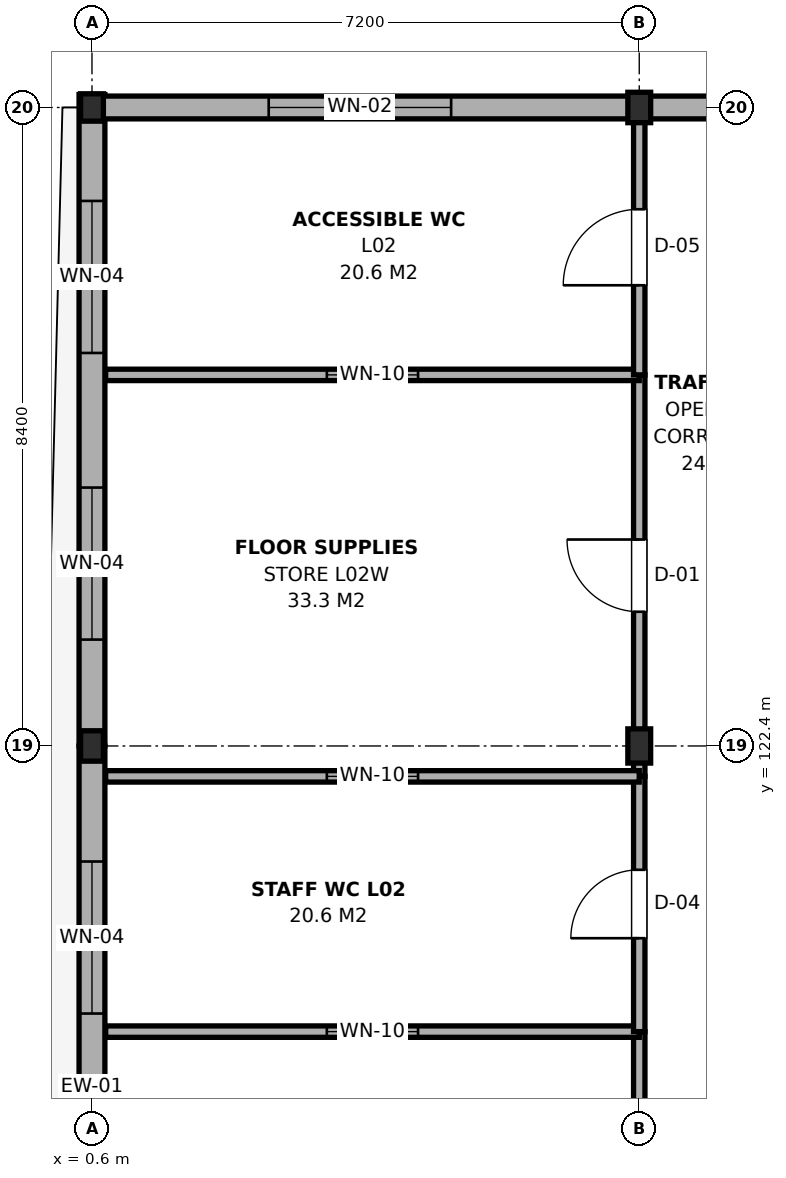
"""IFC4 building model, lengths in metres.
Left out: names, types, materials, properties, quantities, classifications, styles, units other than length and angle.
Written with IfcOpenShell. Run it as: python <this file> out.ifc"""

import sys

from ifc_helpers import new_model, si_unit, direction, frame, frame_2d, origin, origin_2d, place, context, subcontext, project, spatial, rectangle, i_section, extrude, element, fill, save


model = new_model("IFC4")
c1 = context("Model", 3, precision=1e-05, world=origin(), true_north=direction((0.0, 1.0)))
c2 = subcontext(c1, "Body", "Model", "MODEL_VIEW")
j1 = project(units=[si_unit("LENGTHUNIT", "METRE"), si_unit("PLANEANGLEUNIT", "RADIAN")], contexts=[c1])
p1 = place(None, origin())
s1 = spatial("IfcSite", under=j1, at=p1, CompositionType="ELEMENT")
p2 = place(p1, origin())
s2 = spatial("IfcBuilding", under=s1, at=p2, CompositionType="ELEMENT")
p3 = place(p2, frame((0.0, 0.0, 9.0)))
s3 = spatial("IfcBuildingStorey", under=s2, at=p3, CompositionType="ELEMENT", Elevation=9.0)
p4 = place(p3, frame((0.6, 122.4, 0.0), z_axis=(0.0, 0.0, 1.0), x_axis=(1.0, 0.0, 0.0)))
e1 = element("IfcColumn", 1, at=p4, inside=s3, PredefinedType="COLUMN", context=c2, shape_type="SweptSolid", body=[
    extrude(i_section(OverallWidth=0.3, OverallDepth=0.4, WebThickness=0.013, FlangeThickness=0.024, FilletRadius=0.027, at=origin_2d()), origin(), (0.0, 0.0, 1.0), 4.2),
])
p5 = place(p3, frame((0.6, 130.8, 0.0), z_axis=(0.0, 0.0, 1.0), x_axis=(1.0, 0.0, 0.0)))
e2 = element("IfcColumn", 2, at=p5, inside=s3, PredefinedType="COLUMN", context=c2, shape_type="SweptSolid", body=[
    extrude(i_section(OverallWidth=0.3, OverallDepth=0.36, WebThickness=0.012, FlangeThickness=0.022, FilletRadius=0.027, at=origin_2d()), origin(), (0.0, 0.0, 1.0), 4.2),
])
p6 = place(p3, frame((7.8, 122.4, 0.0), z_axis=(0.0, 0.0, 1.0), x_axis=(1.0, 0.0, 0.0)))
e3 = element("IfcColumn", 3, at=p6, inside=s3, PredefinedType="COLUMN", context=c2, shape_type="SweptSolid", body=[
    extrude(i_section(OverallWidth=0.3, OverallDepth=0.45, WebThickness=0.014, FlangeThickness=0.026, FilletRadius=0.027, at=origin_2d()), origin(), (0.0, 0.0, 1.0), 4.2),
])
p7 = place(p3, frame((7.8, 130.8, 0.0), z_axis=(0.0, 0.0, 1.0), x_axis=(1.0, 0.0, 0.0)))
e4 = element("IfcColumn", 4, at=p7, inside=s3, PredefinedType="COLUMN", context=c2, shape_type="SweptSolid", body=[
    extrude(i_section(OverallWidth=0.3, OverallDepth=0.4, WebThickness=0.013, FlangeThickness=0.024, FilletRadius=0.027, at=origin_2d()), origin(), (0.0, 0.0, 1.0), 4.2),
])
p8 = place(p3, frame((0.6, 113.4, 0.0), z_axis=(0.0, 0.0, 1.0), x_axis=(0.0, 1.0, 0.0)))
e5 = element("IfcWall", 5, at=p8, inside=s3, PredefinedType="SOLIDWALL", context=c2, shape_type="SweptSolid", body=[
    extrude(rectangle(XDim=9.0, YDim=0.34, at=frame_2d((4.5, 0.0))), origin(), (0.0, 0.0, 1.0), 3.385),
])
p9 = place(p8, frame((1.52, 0.0, 0.9)))
e6 = element("IfcOpeningElement", 6, at=p9, cuts=e5, PredefinedType="OPENING", context=c2, shape_type="SweptSolid", body=[
    extrude(rectangle(XDim=2.0, YDim=1.8, at=frame_2d((1.0, 0.9))), frame((0.0, 0.185, 0.0), z_axis=(0.0, -1.0, 0.0), x_axis=(1.0, 0.0, 0.0)), (0.0, 0.0, 1.0), 0.37),
])
p10 = place(p8, frame((5.48, 0.0, 0.9)))
e7 = element("IfcOpeningElement", 7, at=p10, cuts=e5, PredefinedType="OPENING", context=c2, shape_type="SweptSolid", body=[
    extrude(rectangle(XDim=2.0, YDim=1.8, at=frame_2d((1.0, 0.9))), frame((0.0, 0.185, 0.0), z_axis=(0.0, -1.0, 0.0), x_axis=(1.0, 0.0, 0.0)), (0.0, 0.0, 1.0), 0.37),
])
p11 = place(p3, frame((0.6, 122.4, 0.0), z_axis=(0.0, 0.0, 1.0), x_axis=(0.0, 1.0, 0.0)))
e8 = element("IfcWall", 8, at=p11, inside=s3, PredefinedType="SOLIDWALL", context=c2, shape_type="SweptSolid", body=[
    extrude(rectangle(XDim=8.57, YDim=0.34, at=frame_2d((4.285, 0.0))), origin(), (0.0, 0.0, 1.0), 3.435),
])
p12 = place(p11, frame((1.4, 0.0, 0.9)))
e9 = element("IfcOpeningElement", 9, at=p12, cuts=e8, PredefinedType="OPENING", context=c2, shape_type="SweptSolid", body=[
    extrude(rectangle(XDim=2.0, YDim=1.8, at=frame_2d((1.0, 0.9))), frame((0.0, 0.185, 0.0), z_axis=(0.0, -1.0, 0.0), x_axis=(1.0, 0.0, 0.0)), (0.0, 0.0, 1.0), 0.37),
])
p13 = place(p11, frame((5.17, 0.0, 0.9)))
e10 = element("IfcOpeningElement", 10, at=p13, cuts=e8, PredefinedType="OPENING", context=c2, shape_type="SweptSolid", body=[
    extrude(rectangle(XDim=2.0, YDim=1.8, at=frame_2d((1.0, 0.9))), frame((0.0, 0.185, 0.0), z_axis=(0.0, -1.0, 0.0), x_axis=(1.0, 0.0, 0.0)), (0.0, 0.0, 1.0), 0.37),
])
p14 = place(p3, frame((0.45, 130.8, 0.0), z_axis=(0.0, 0.0, 1.0), x_axis=(1.0, 0.0, 0.0)))
e11 = element("IfcWall", 11, at=p14, inside=s3, PredefinedType="SOLIDWALL", context=c2, shape_type="SweptSolid", body=[
    extrude(rectangle(XDim=7.35, YDim=0.3, at=frame_2d((3.675, 0.0))), origin(), (0.0, 0.0, 1.0), 3.375),
])
p15 = place(p14, frame((2.475, 0.0, 0.9)))
e12 = element("IfcOpeningElement", 12, at=p15, cuts=e11, PredefinedType="OPENING", context=c2, shape_type="SweptSolid", body=[
    extrude(rectangle(XDim=2.4, YDim=2.1, at=frame_2d((1.2, 1.05))), frame((0.0, 0.165, 0.0), z_axis=(0.0, -1.0, 0.0), x_axis=(1.0, 0.0, 0.0)), (0.0, 0.0, 1.0), 0.33),
])
p16 = place(p3, frame((7.8, 130.8, 0.0), z_axis=(0.0, 0.0, 1.0), x_axis=(1.0, 0.0, 0.0)))
e13 = element("IfcWall", 13, at=p16, inside=s3, PredefinedType="SOLIDWALL", context=c2, shape_type="SweptSolid", body=[
    extrude(rectangle(XDim=7.2, YDim=0.3, at=frame_2d((3.6, 0.0))), origin(), (0.0, 0.0, 1.0), 3.375),
])
p17 = place(p16, frame((3.35, 0.0, 0.9)))
e14 = element("IfcOpeningElement", 14, at=p17, cuts=e13, PredefinedType="OPENING", context=c2, shape_type="SweptSolid", body=[
    extrude(rectangle(XDim=2.4, YDim=2.1, at=frame_2d((1.2, 1.05))), frame((0.0, 0.165, 0.0), z_axis=(0.0, -1.0, 0.0), x_axis=(1.0, 0.0, 0.0)), (0.0, 0.0, 1.0), 0.33),
])
p18 = place(p3, frame((7.8, 113.4, 0.0), z_axis=(0.0, 0.0, 1.0), x_axis=(0.0, 1.0, 0.0)))
e15 = element("IfcWall", 15, at=p18, inside=s3, PredefinedType="PARTITIONING", context=c2, shape_type="SweptSolid", body=[
    extrude(rectangle(XDim=5.242, YDim=0.15, at=frame_2d((2.621, 0.0))), origin(), (0.0, 0.0, 1.0), 3.585),
])
p19 = place(p18, frame((2.146, 0.0, 0.0)))
e16 = element("IfcOpeningElement", 16, at=p19, cuts=e15, PredefinedType="OPENING", context=c2, shape_type="SweptSolid", body=[
    extrude(rectangle(XDim=0.95, YDim=2.15, at=frame_2d((0.475, 1.075))), frame((0.0, 0.09, 0.0), z_axis=(0.0, -1.0, 0.0), x_axis=(1.0, 0.0, 0.0)), (0.0, 0.0, 1.0), 0.18),
])
p20 = place(p3, frame((0.78, 118.642, 0.0), z_axis=(0.0, 0.0, 1.0), x_axis=(1.0, 0.0, 0.0)))
e17 = element("IfcWall", 17, at=p20, inside=s3, PredefinedType="PARTITIONING", context=c2, shape_type="SweptSolid", body=[
    extrude(rectangle(XDim=7.02, YDim=0.15, at=frame_2d((3.51, 0.0))), origin(), (0.0, 0.0, 1.0), 3.435),
])
p21 = place(p20, frame((2.91, 0.0, 0.95)))
e18 = element("IfcOpeningElement", 18, at=p21, cuts=e17, PredefinedType="OPENING", context=c2, shape_type="SweptSolid", body=[
    extrude(rectangle(XDim=1.2, YDim=1.5, at=frame_2d((0.6, 0.75))), frame((0.0, 0.09, 0.0), z_axis=(0.0, -1.0, 0.0), x_axis=(1.0, 0.0, 0.0)), (0.0, 0.0, 1.0), 0.18),
])
p22 = place(p3, frame((7.8, 118.642, 0.0), z_axis=(0.0, 0.0, 1.0), x_axis=(0.0, 1.0, 0.0)))
e19 = element("IfcWall", 19, at=p22, inside=s3, PredefinedType="PARTITIONING", context=c2, shape_type="SweptSolid", body=[
    extrude(rectangle(XDim=3.358, YDim=0.15, at=frame_2d((1.679, 0.0))), origin(), (0.0, 0.0, 1.0), 3.625),
])
p23 = place(p22, frame((1.229, 0.0, 0.0)))
e20 = element("IfcOpeningElement", 20, at=p23, cuts=e19, PredefinedType="OPENING", context=c2, shape_type="SweptSolid", body=[
    extrude(rectangle(XDim=0.9, YDim=2.15, at=frame_2d((0.45, 1.075))), frame((0.0, 0.09, 0.0), z_axis=(0.0, -1.0, 0.0), x_axis=(1.0, 0.0, 0.0)), (0.0, 0.0, 1.0), 0.18),
])
p24 = place(p3, frame((7.8, 122.0, 0.0), z_axis=(0.0, 0.0, 1.0), x_axis=(0.0, 1.0, 0.0)))
e21 = element("IfcWall", 21, at=p24, inside=s3, PredefinedType="PARTITIONING", context=c2, shape_type="SweptSolid", body=[
    extrude(rectangle(XDim=5.282, YDim=0.15, at=frame_2d((2.641, 0.0))), origin(), (0.0, 0.0, 1.0), 3.375),
])
p25 = place(p24, frame((2.166, 0.0, 0.0)))
e22 = element("IfcOpeningElement", 22, at=p25, cuts=e21, PredefinedType="OPENING", context=c2, shape_type="SweptSolid", body=[
    extrude(rectangle(XDim=0.95, YDim=2.15, at=frame_2d((0.475, 1.075))), frame((0.0, 0.09, 0.0), z_axis=(0.0, -1.0, 0.0), x_axis=(1.0, 0.0, 0.0)), (0.0, 0.0, 1.0), 0.18),
])
p26 = place(p3, frame((0.78, 127.282, 0.0), z_axis=(0.0, 0.0, 1.0), x_axis=(1.0, 0.0, 0.0)))
e23 = element("IfcWall", 23, at=p26, inside=s3, PredefinedType="PARTITIONING", context=c2, shape_type="SweptSolid", body=[
    extrude(rectangle(XDim=7.02, YDim=0.15, at=frame_2d((3.51, 0.0))), origin(), (0.0, 0.0, 1.0), 3.385),
])
p27 = place(p26, frame((2.91, 0.0, 0.95)))
e24 = element("IfcOpeningElement", 24, at=p27, cuts=e23, PredefinedType="OPENING", context=c2, shape_type="SweptSolid", body=[
    extrude(rectangle(XDim=1.2, YDim=1.5, at=frame_2d((0.6, 0.75))), frame((0.0, 0.09, 0.0), z_axis=(0.0, -1.0, 0.0), x_axis=(1.0, 0.0, 0.0)), (0.0, 0.0, 1.0), 0.18),
])
p28 = place(p3, frame((7.8, 127.282, 0.0), z_axis=(0.0, 0.0, 1.0), x_axis=(0.0, 1.0, 0.0)))
e25 = element("IfcWall", 25, at=p28, inside=s3, PredefinedType="PARTITIONING", context=c2, shape_type="SweptSolid", body=[
    extrude(rectangle(XDim=3.358, YDim=0.15, at=frame_2d((1.679, 0.0))), origin(), (0.0, 0.0, 1.0), 3.375),
])
p29 = place(p28, frame((1.179, 0.0, 0.0)))
e26 = element("IfcOpeningElement", 26, at=p29, cuts=e25, PredefinedType="OPENING", context=c2, shape_type="SweptSolid", body=[
    extrude(rectangle(XDim=1.0, YDim=2.15, at=frame_2d((0.5, 1.075))), frame((0.0, 0.09, 0.0), z_axis=(0.0, -1.0, 0.0), x_axis=(1.0, 0.0, 0.0)), (0.0, 0.0, 1.0), 0.18),
])
p30 = place(p3, frame((0.78, 122.0, 0.0), z_axis=(0.0, 0.0, 1.0), x_axis=(1.0, 0.0, 0.0)))
e27 = element("IfcWall", 27, at=p30, inside=s3, PredefinedType="PARTITIONING", context=c2, shape_type="SweptSolid", body=[
    extrude(rectangle(XDim=7.02, YDim=0.15, at=frame_2d((3.51, 0.0))), origin(), (0.0, 0.0, 1.0), 3.435),
])
p31 = place(p30, frame((2.91, 0.0, 0.95)))
e28 = element("IfcOpeningElement", 28, at=p31, cuts=e27, PredefinedType="OPENING", context=c2, shape_type="SweptSolid", body=[
    extrude(rectangle(XDim=1.2, YDim=1.5, at=frame_2d((0.6, 0.75))), frame((0.0, 0.09, 0.0), z_axis=(0.0, -1.0, 0.0), x_axis=(1.0, 0.0, 0.0)), (0.0, 0.0, 1.0), 0.18),
])
p32 = place(p10, origin())
e29 = element("IfcWindow", 29, at=p32, inside=s3, PartitioningType="SINGLE_PANEL", PredefinedType="WINDOW", context=c2, shape_type="SweptSolid", body=[
    extrude(rectangle(XDim=2.0, YDim=1.8, at=frame_2d((1.0, 0.9))), frame((0.0, 0.03, 0.0), z_axis=(0.0, -1.0, 0.0), x_axis=(1.0, 0.0, 0.0)), (0.0, 0.0, 1.0), 0.06),
])
fill(e7, e29)
p33 = place(p12, origin())
e30 = element("IfcWindow", 30, at=p33, inside=s3, PartitioningType="SINGLE_PANEL", PredefinedType="WINDOW", context=c2, shape_type="SweptSolid", body=[
    extrude(rectangle(XDim=2.0, YDim=1.8, at=frame_2d((1.0, 0.9))), frame((0.0, 0.03, 0.0), z_axis=(0.0, -1.0, 0.0), x_axis=(1.0, 0.0, 0.0)), (0.0, 0.0, 1.0), 0.06),
])
fill(e9, e30)
p34 = place(p13, origin())
e31 = element("IfcWindow", 31, at=p34, inside=s3, PartitioningType="SINGLE_PANEL", PredefinedType="WINDOW", context=c2, shape_type="SweptSolid", body=[
    extrude(rectangle(XDim=2.0, YDim=1.8, at=frame_2d((1.0, 0.9))), frame((0.0, 0.03, 0.0), z_axis=(0.0, -1.0, 0.0), x_axis=(1.0, 0.0, 0.0)), (0.0, 0.0, 1.0), 0.06),
])
fill(e10, e31)
p35 = place(p15, origin())
e32 = element("IfcWindow", 32, at=p35, inside=s3, PartitioningType="SINGLE_PANEL", PredefinedType="WINDOW", context=c2, shape_type="SweptSolid", body=[
    extrude(rectangle(XDim=2.4, YDim=2.1, at=frame_2d((1.2, 1.05))), frame((0.0, 0.03, 0.0), z_axis=(0.0, -1.0, 0.0), x_axis=(1.0, 0.0, 0.0)), (0.0, 0.0, 1.0), 0.06),
])
fill(e12, e32)
p36 = place(p21, origin())
e33 = element("IfcWindow", 33, at=p36, inside=s3, PartitioningType="SINGLE_PANEL", PredefinedType="WINDOW", context=c2, shape_type="SweptSolid", body=[
    extrude(rectangle(XDim=1.2, YDim=1.5, at=frame_2d((0.6, 0.75))), frame((0.0, 0.03, 0.0), z_axis=(0.0, -1.0, 0.0), x_axis=(1.0, 0.0, 0.0)), (0.0, 0.0, 1.0), 0.06),
])
fill(e18, e33)
p37 = place(p23, origin())
e34 = element("IfcDoor", 34, at=p37, inside=s3, OperationType="SINGLE_SWING_LEFT", PredefinedType="DOOR", context=c2, shape_type="SweptSolid", body=[
    extrude(rectangle(XDim=0.9, YDim=2.15, at=frame_2d((0.45, 1.075))), frame((0.0, 0.025, 0.0), z_axis=(0.0, -1.0, 0.0), x_axis=(1.0, 0.0, 0.0)), (0.0, 0.0, 1.0), 0.05),
])
fill(e20, e34)
p38 = place(p25, origin())
e35 = element("IfcDoor", 35, at=p38, inside=s3, OperationType="SINGLE_SWING_RIGHT", PredefinedType="DOOR", context=c2, shape_type="SweptSolid", body=[
    extrude(rectangle(XDim=0.95, YDim=2.15, at=frame_2d((0.475, 1.075))), frame((0.0, 0.025, 0.0), z_axis=(0.0, -1.0, 0.0), x_axis=(1.0, 0.0, 0.0)), (0.0, 0.0, 1.0), 0.05),
])
fill(e22, e35)
p39 = place(p27, origin())
e36 = element("IfcWindow", 36, at=p39, inside=s3, PartitioningType="SINGLE_PANEL", PredefinedType="WINDOW", context=c2, shape_type="SweptSolid", body=[
    extrude(rectangle(XDim=1.2, YDim=1.5, at=frame_2d((0.6, 0.75))), frame((0.0, 0.03, 0.0), z_axis=(0.0, -1.0, 0.0), x_axis=(1.0, 0.0, 0.0)), (0.0, 0.0, 1.0), 0.06),
])
fill(e24, e36)
p40 = place(p29, origin())
e37 = element("IfcDoor", 37, at=p40, inside=s3, OperationType="SINGLE_SWING_LEFT", PredefinedType="DOOR", context=c2, shape_type="SweptSolid", body=[
    extrude(rectangle(XDim=1.0, YDim=2.15, at=frame_2d((0.5, 1.075))), frame((0.0, 0.025, 0.0), z_axis=(0.0, -1.0, 0.0), x_axis=(1.0, 0.0, 0.0)), (0.0, 0.0, 1.0), 0.05),
])
fill(e26, e37)
p41 = place(p31, origin())
e38 = element("IfcWindow", 38, at=p41, inside=s3, PartitioningType="SINGLE_PANEL", PredefinedType="WINDOW", context=c2, shape_type="SweptSolid", body=[
    extrude(rectangle(XDim=1.2, YDim=1.5, at=frame_2d((0.6, 0.75))), frame((0.0, 0.03, 0.0), z_axis=(0.0, -1.0, 0.0), x_axis=(1.0, 0.0, 0.0)), (0.0, 0.0, 1.0), 0.06),
])
fill(e28, e38)
save(model, sys.argv[1])
